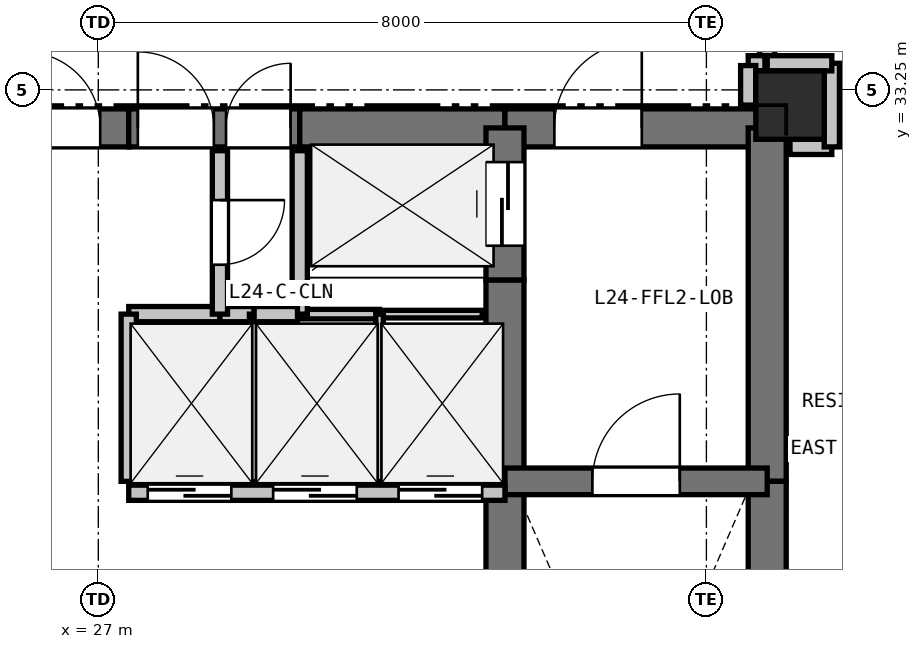
"""IFC4 building model, lengths in metres.
Left out: names, types, materials, properties, quantities, classifications, styles, units other than length and angle.
Written with IfcOpenShell. Run it as: python <this file> out.ifc"""

import sys

from ifc_helpers import new_model, si_unit, direction, frame, frame_2d, origin, origin_2d, place, context, subcontext, project, spatial, rectangle, extrude, element, fill, save


model = new_model("IFC4")
c1 = context("Model", 3, precision=1e-05, world=origin(), true_north=direction((0.0, 1.0)))
c2 = subcontext(c1, "Body", "Model", "MODEL_VIEW")
j1 = project(units=[si_unit("LENGTHUNIT", "METRE"), si_unit("PLANEANGLEUNIT", "RADIAN")], contexts=[c1])
p1 = place(None, origin())
s1 = spatial("IfcSite", under=j1, at=p1, CompositionType="ELEMENT")
p2 = place(p1, origin())
s2 = spatial("IfcBuilding", under=s1, at=p2, CompositionType="ELEMENT")
p3 = place(p2, frame((0.0, 0.0, 90.0)))
s3 = spatial("IfcBuildingStorey", under=s2, at=p3, CompositionType="ELEMENT", Elevation=90.0)
p4 = place(p3, frame((36.1, 33.05, 0.0), z_axis=(0.0, 0.0, 1.0), x_axis=(1.0, 0.0, 0.0)))
e1 = element("IfcColumn", 1, at=p4, inside=s3, PredefinedType="COLUMN", context=c2, shape_type="SweptSolid", body=[
    extrude(rectangle(XDim=0.9, YDim=0.9, at=origin_2d()), origin(), (0.0, 0.0, 1.0), 3.3),
])
p5 = place(p3, frame((25.65, 32.75, 0.0), z_axis=(0.0, 0.0, 1.0), x_axis=(1.0, 0.0, 0.0)))
e2 = element("IfcWall", 2, at=p5, inside=s3, PredefinedType="SHEAR", context=c2, shape_type="SweptSolid", body=[
    extrude(rectangle(XDim=1.75, YDim=0.5, at=frame_2d((0.875, 0.0))), origin(), (0.0, 0.0, 1.0), 3.05),
])
p6 = place(p5, frame((0.375, 0.0, 0.0)))
e3 = element("IfcOpeningElement", 3, at=p6, cuts=e2, PredefinedType="OPENING", context=c2, shape_type="SweptSolid", body=[
    extrude(rectangle(XDim=1.0, YDim=2.15, at=frame_2d((0.5, 1.075))), frame((0.0, 0.26, 0.0), z_axis=(0.0, -1.0, 0.0), x_axis=(1.0, 0.0, 0.0)), (0.0, 0.0, 1.0), 0.52),
])
p7 = place(p3, frame((27.4, 32.75, 0.0), z_axis=(0.0, 0.0, 1.0), x_axis=(1.0, 0.0, 0.0)))
e4 = element("IfcWall", 4, at=p7, inside=s3, PredefinedType="SHEAR", context=c2, shape_type="SweptSolid", body=[
    extrude(rectangle(XDim=2.25, YDim=0.5, at=frame_2d((1.125, 0.0))), origin(), (0.0, 0.0, 1.0), 3.05),
])
p8 = place(p7, frame((0.12, 0.0, 0.0)))
e5 = element("IfcOpeningElement", 5, at=p8, cuts=e4, PredefinedType="OPENING", context=c2, shape_type="SweptSolid", body=[
    extrude(rectangle(XDim=1.0, YDim=2.15, at=frame_2d((0.5, 1.075))), frame((0.0, 0.26, 0.0), z_axis=(0.0, -1.0, 0.0), x_axis=(1.0, 0.0, 0.0)), (0.0, 0.0, 1.0), 0.52),
])
p9 = place(p7, frame((1.28, 0.0, 0.0)))
e6 = element("IfcOpeningElement", 6, at=p9, cuts=e4, PredefinedType="OPENING", context=c2, shape_type="SweptSolid", body=[
    extrude(rectangle(XDim=0.85, YDim=2.1, at=frame_2d((0.425, 1.05))), frame((0.0, 0.26, 0.0), z_axis=(0.0, -1.0, 0.0), x_axis=(1.0, 0.0, 0.0)), (0.0, 0.0, 1.0), 0.52),
])
p10 = place(p3, frame((29.65, 32.75, 0.0), z_axis=(0.0, 0.0, 1.0), x_axis=(1.0, 0.0, 0.0)))
e7 = element("IfcWall", 7, at=p10, inside=s3, PredefinedType="SHEAR", context=c2, shape_type="SweptSolid", body=[
    extrude(rectangle(XDim=2.7, YDim=0.5, at=frame_2d((1.35, 0.0))), origin(), (0.0, 0.0, 1.0), 3.05),
])
p11 = place(p3, frame((32.35, 32.75, 0.0), z_axis=(0.0, 0.0, 1.0), x_axis=(1.0, 0.0, 0.0)))
e8 = element("IfcWall", 8, at=p11, inside=s3, PredefinedType="SHEAR", context=c2, shape_type="SweptSolid", body=[
    extrude(rectangle(XDim=3.45, YDim=0.5, at=frame_2d((1.725, 0.0))), origin(), (0.0, 0.0, 1.0), 3.05),
])
p12 = place(p11, frame((0.65, 0.0, 0.0)))
e9 = element("IfcOpeningElement", 9, at=p12, cuts=e8, PredefinedType="OPENING", context=c2, shape_type="SweptSolid", body=[
    extrude(rectangle(XDim=1.15, YDim=2.15, at=frame_2d((0.575, 1.075))), frame((0.0, 0.26, 0.0), z_axis=(0.0, -1.0, 0.0), x_axis=(1.0, 0.0, 0.0)), (0.0, 0.0, 1.0), 0.52),
])
p13 = place(p3, frame((35.8, 32.75, 0.0), z_axis=(0.0, 0.0, 1.0), x_axis=(0.0, -1.0, 0.0)))
e10 = element("IfcWall", 10, at=p13, inside=s3, PredefinedType="SHEAR", context=c2, shape_type="SweptSolid", body=[
    extrude(rectangle(XDim=4.65, YDim=0.5, at=frame_2d((2.325, 0.0))), origin(), (0.0, 0.0, 1.0), 3.05),
])
p14 = place(p3, frame((35.8, 28.1, 0.0), z_axis=(0.0, 0.0, 1.0), x_axis=(0.0, -1.0, 0.0)))
e11 = element("IfcWall", 11, at=p14, inside=s3, PredefinedType="SHEAR", context=c2, shape_type="SweptSolid", body=[
    extrude(rectangle(XDim=7.35, YDim=0.5, at=frame_2d((3.675, 0.0))), origin(), (0.0, 0.0, 1.0), 3.05),
])
p15 = place(p3, frame((32.35, 25.55, 0.0), z_axis=(0.0, 0.0, 1.0), x_axis=(0.0, 1.0, 0.0)))
e12 = element("IfcWall", 12, at=p15, inside=s3, PredefinedType="SHEAR", context=c2, shape_type="SweptSolid", body=[
    extrude(rectangle(XDim=2.4, YDim=0.5, at=frame_2d((1.2, 0.0))), origin(), (0.0, 0.0, 1.0), 3.05),
])
p16 = place(p3, frame((32.35, 27.95, 0.0), z_axis=(0.0, 0.0, 1.0), x_axis=(0.0, 1.0, 0.0)))
e13 = element("IfcWall", 13, at=p16, inside=s3, PredefinedType="SHEAR", context=c2, shape_type="SweptSolid", body=[
    extrude(rectangle(XDim=2.8, YDim=0.5, at=frame_2d((1.4, 0.0))), origin(), (0.0, 0.0, 1.0), 3.05),
])
p17 = place(p3, frame((32.35, 30.75, 0.0), z_axis=(0.0, 0.0, 1.0), x_axis=(0.0, 1.0, 0.0)))
e14 = element("IfcWall", 14, at=p17, inside=s3, PredefinedType="SHEAR", context=c2, shape_type="SweptSolid", body=[
    extrude(rectangle(XDim=2.0, YDim=0.5, at=frame_2d((1.0, 0.0))), origin(), (0.0, 0.0, 1.0), 3.05),
])
p18 = place(p17, frame((0.45, 0.0, 0.0)))
e15 = element("IfcOpeningElement", 15, at=p18, cuts=e14, PredefinedType="OPENING", context=c2, shape_type="SweptSolid", body=[
    extrude(rectangle(XDim=1.1, YDim=2.15, at=frame_2d((0.55, 1.075))), frame((0.0, 0.26, 0.0), z_axis=(0.0, -1.0, 0.0), x_axis=(1.0, 0.0, 0.0)), (0.0, 0.0, 1.0), 0.52),
])
p19 = place(p3, frame((32.35, 28.1, 0.0), z_axis=(0.0, 0.0, 1.0), x_axis=(1.0, 0.0, 0.0)))
e16 = element("IfcWall", 16, at=p19, inside=s3, PredefinedType="SHEAR", context=c2, shape_type="SweptSolid", body=[
    extrude(rectangle(XDim=3.45, YDim=0.35, at=frame_2d((1.725, 0.0))), origin(), (0.0, 0.0, 1.0), 3.05),
])
p20 = place(p19, frame((1.15, 0.0, 0.0)))
e17 = element("IfcOpeningElement", 17, at=p20, cuts=e16, PredefinedType="OPENING", context=c2, shape_type="SweptSolid", body=[
    extrude(rectangle(XDim=1.15, YDim=2.15, at=frame_2d((0.575, 1.075))), frame((0.0, 0.185, 0.0), z_axis=(0.0, -1.0, 0.0), x_axis=(1.0, 0.0, 0.0)), (0.0, 0.0, 1.0), 0.37),
])
p21 = place(p3, frame((27.4, 27.95, 0.0), z_axis=(0.0, 0.0, 1.0), x_axis=(1.0, 0.0, 0.0)))
e18 = element("IfcWall", 18, at=p21, inside=s3, PredefinedType="PARTITIONING", context=c2, shape_type="SweptSolid", body=[
    extrude(rectangle(XDim=4.95, YDim=0.2, at=frame_2d((2.475, 0.0))), origin(), (0.0, 0.0, 1.0), 3.05),
])
p22 = place(p21, frame((0.25, 0.0, 0.0)))
e19 = element("IfcOpeningElement", 19, at=p22, cuts=e18, PredefinedType="OPENING", context=c2, shape_type="SweptSolid", body=[
    extrude(rectangle(XDim=1.1, YDim=2.15, at=frame_2d((0.55, 1.075))), frame((0.0, 0.11, 0.0), z_axis=(0.0, -1.0, 0.0), x_axis=(1.0, 0.0, 0.0)), (0.0, 0.0, 1.0), 0.22),
])
p23 = place(p21, frame((1.9, 0.0, 0.0)))
e20 = element("IfcOpeningElement", 20, at=p23, cuts=e18, PredefinedType="OPENING", context=c2, shape_type="SweptSolid", body=[
    extrude(rectangle(XDim=1.1, YDim=2.15, at=frame_2d((0.55, 1.075))), frame((0.0, 0.11, 0.0), z_axis=(0.0, -1.0, 0.0), x_axis=(1.0, 0.0, 0.0)), (0.0, 0.0, 1.0), 0.22),
])
p24 = place(p21, frame((3.55, 0.0, 0.0)))
e21 = element("IfcOpeningElement", 21, at=p24, cuts=e18, PredefinedType="OPENING", context=c2, shape_type="SweptSolid", body=[
    extrude(rectangle(XDim=1.1, YDim=2.15, at=frame_2d((0.55, 1.075))), frame((0.0, 0.11, 0.0), z_axis=(0.0, -1.0, 0.0), x_axis=(1.0, 0.0, 0.0)), (0.0, 0.0, 1.0), 0.22),
])
p25 = place(p3, frame((32.05, 30.3, 0.0), z_axis=(0.0, 0.0, 1.0), x_axis=(-1.0, 0.0, 0.0)))
e22 = element("IfcWall", 22, at=p25, inside=s3, PredefinedType="PARTITIONING", context=c2, shape_type="SweptSolid", body=[
    extrude(rectangle(XDim=1.35, YDim=0.1, at=frame_2d((0.675, 0.0))), origin(), (0.0, 0.0, 1.0), 3.05),
])
p26 = place(p3, frame((30.7, 30.3, 0.0), z_axis=(0.0, 0.0, 1.0), x_axis=(-1.0, 0.0, 0.0)))
e23 = element("IfcWall", 23, at=p26, inside=s3, PredefinedType="PARTITIONING", context=c2, shape_type="SweptSolid", body=[
    extrude(rectangle(XDim=1.05, YDim=0.125, at=frame_2d((0.525, 0.0))), origin(), (0.0, 0.0, 1.0), 3.05),
])
p27 = place(p3, frame((29.65, 30.3, 0.0), z_axis=(0.0, 0.0, 1.0), x_axis=(0.0, 1.0, 0.0)))
e24 = element("IfcWall", 24, at=p27, inside=s3, PredefinedType="PARTITIONING", context=c2, shape_type="SweptSolid", body=[
    extrude(rectangle(XDim=2.15, YDim=0.2, at=frame_2d((1.075, 0.0))), origin(), (0.0, 0.0, 1.0), 3.05),
])
p28 = place(p3, frame((27.4, 30.3, 0.0), z_axis=(0.0, 0.0, 1.0), x_axis=(1.0, 0.0, 0.0)))
e25 = element("IfcWall", 25, at=p28, inside=s3, PredefinedType="PARTITIONING", context=c2, shape_type="SweptSolid", body=[
    extrude(rectangle(XDim=1.2, YDim=0.2, at=frame_2d((0.6, 0.0))), origin(), (0.0, 0.0, 1.0), 3.05),
])
p29 = place(p3, frame((28.6, 30.3, 0.0), z_axis=(0.0, 0.0, 1.0), x_axis=(1.0, 0.0, 0.0)))
e26 = element("IfcWall", 26, at=p29, inside=s3, PredefinedType="PARTITIONING", context=c2, shape_type="SweptSolid", body=[
    extrude(rectangle(XDim=0.45, YDim=0.2, at=frame_2d((0.225, 0.0))), origin(), (0.0, 0.0, 1.0), 3.05),
])
p30 = place(p3, frame((29.05, 30.3, 0.0), z_axis=(0.0, 0.0, 1.0), x_axis=(0.0, -1.0, 0.0)))
e27 = element("IfcWall", 27, at=p30, inside=s3, PredefinedType="PARTITIONING", context=c2, shape_type="SweptSolid", body=[
    extrude(rectangle(XDim=2.2, YDim=0.125, at=frame_2d((1.1, 0.0))), origin(), (0.0, 0.0, 1.0), 3.05),
])
p31 = place(p3, frame((27.4, 28.1, 0.0), z_axis=(0.0, 0.0, 1.0), x_axis=(0.0, 1.0, 0.0)))
e28 = element("IfcWall", 28, at=p31, inside=s3, PredefinedType="PARTITIONING", context=c2, shape_type="SweptSolid", body=[
    extrude(rectangle(XDim=2.2, YDim=0.2, at=frame_2d((1.1, 0.0))), origin(), (0.0, 0.0, 1.0), 3.05),
])
p32 = place(p3, frame((29.05, 30.3, 0.0), z_axis=(0.0, 0.0, 1.0), x_axis=(1.0, 0.0, 0.0)))
e29 = element("IfcWall", 29, at=p32, inside=s3, PredefinedType="PARTITIONING", context=c2, shape_type="SweptSolid", body=[
    extrude(rectangle(XDim=0.57, YDim=0.2, at=frame_2d((0.285, 0.0))), origin(), (0.0, 0.0, 1.0), 3.05),
])
p33 = place(p3, frame((30.7, 30.3, 0.0), z_axis=(0.0, 0.0, 1.0), x_axis=(0.0, -1.0, 0.0)))
e30 = element("IfcWall", 30, at=p33, inside=s3, PredefinedType="PARTITIONING", context=c2, shape_type="SweptSolid", body=[
    extrude(rectangle(XDim=2.2, YDim=0.1, at=frame_2d((1.1, 0.0))), origin(), (0.0, 0.0, 1.0), 3.05),
])
p34 = place(p3, frame((28.6, 32.45, 0.0), z_axis=(0.0, 0.0, 1.0), x_axis=(0.0, -1.0, 0.0)))
e31 = element("IfcWall", 31, at=p34, inside=s3, PredefinedType="PARTITIONING", context=c2, shape_type="SweptSolid", body=[
    extrude(rectangle(XDim=2.15, YDim=0.2, at=frame_2d((1.075, 0.0))), origin(), (0.0, 0.0, 1.0), 3.05),
])
p35 = place(p34, frame((0.65, 0.0, 0.0)))
e32 = element("IfcOpeningElement", 32, at=p35, cuts=e31, PredefinedType="OPENING", context=c2, shape_type="SweptSolid", body=[
    extrude(rectangle(XDim=0.85, YDim=2.1, at=frame_2d((0.425, 1.05))), frame((0.0, 0.11, 0.0), z_axis=(0.0, -1.0, 0.0), x_axis=(1.0, 0.0, 0.0)), (0.0, 0.0, 1.0), 0.22),
])
p36 = place(p3, frame((35.8, 35.35, 0.0), z_axis=(0.0, 0.0, 1.0), x_axis=(0.0, -1.0, 0.0)))
e33 = element("IfcWall", 33, at=p36, inside=s3, PredefinedType="PARTITIONING", context=c2, shape_type="SweptSolid", body=[
    extrude(rectangle(XDim=1.75, YDim=0.2, at=frame_2d((0.875, 0.0))), origin(), (0.0, 0.0, 1.0), 3.05),
])
p37 = place(p36, frame((0.375, 0.0, 0.0)))
e34 = element("IfcOpeningElement", 34, at=p37, cuts=e33, PredefinedType="OPENING", context=c2, shape_type="SweptSolid", body=[
    extrude(rectangle(XDim=1.0, YDim=2.15, at=frame_2d((0.5, 1.075))), frame((0.0, 0.11, 0.0), z_axis=(0.0, -1.0, 0.0), x_axis=(1.0, 0.0, 0.0)), (0.0, 0.0, 1.0), 0.22),
])
p38 = place(p3, frame((35.77, 33.6, 0.0), z_axis=(0.0, 0.0, 1.0), x_axis=(-1.0, 0.0, 0.0)))
e35 = element("IfcWall", 35, at=p38, inside=s3, PredefinedType="PARTITIONING", context=c2, shape_type="SweptSolid", body=[
    extrude(rectangle(XDim=0.22, YDim=0.2, at=frame_2d((0.11, 0.0))), origin(), (0.0, 0.0, 1.0), 3.05),
])
p39 = place(p3, frame((35.55, 33.57, 0.0), z_axis=(0.0, 0.0, 1.0), x_axis=(0.0, -1.0, 0.0)))
e36 = element("IfcWall", 36, at=p39, inside=s3, PredefinedType="PARTITIONING", context=c2, shape_type="SweptSolid", body=[
    extrude(rectangle(XDim=0.52, YDim=0.2, at=frame_2d((0.26, 0.0))), origin(), (0.0, 0.0, 1.0), 2.498),
])
p40 = place(p3, frame((36.1, 32.5, 0.0), z_axis=(0.0, 0.0, 1.0), x_axis=(1.0, 0.0, 0.0)))
e37 = element("IfcWall", 37, at=p40, inside=s3, PredefinedType="PARTITIONING", context=c2, shape_type="SweptSolid", body=[
    extrude(rectangle(XDim=0.55, YDim=0.2, at=frame_2d((0.275, 0.0))), origin(), (0.0, 0.0, 1.0), 2.498),
])
p41 = place(p3, frame((36.65, 32.5, 0.0), z_axis=(0.0, 0.0, 1.0), x_axis=(0.0, 1.0, 0.0)))
e38 = element("IfcWall", 38, at=p41, inside=s3, PredefinedType="PARTITIONING", context=c2, shape_type="SweptSolid", body=[
    extrude(rectangle(XDim=1.1, YDim=0.2, at=frame_2d((0.55, 0.0))), origin(), (0.0, 0.0, 1.0), 2.423),
])
p42 = place(p3, frame((36.65, 33.6, 0.0), z_axis=(0.0, 0.0, 1.0), x_axis=(-1.0, 0.0, 0.0)))
e39 = element("IfcWall", 39, at=p42, inside=s3, PredefinedType="PARTITIONING", context=c2, shape_type="SweptSolid", body=[
    extrude(rectangle(XDim=0.85, YDim=0.2, at=frame_2d((0.425, 0.0))), origin(), (0.0, 0.0, 1.0), 2.423),
])
p43 = place(p22, origin())
e40 = element("IfcDoor", 40, at=p43, inside=s3, OperationType="SLIDING_TO_LEFT", PredefinedType="DOOR", context=c2, shape_type="SweptSolid", body=[
    extrude(rectangle(XDim=1.1, YDim=2.15, at=frame_2d((0.55, 1.075))), frame((0.0, 0.025, 0.0), z_axis=(0.0, -1.0, 0.0), x_axis=(1.0, 0.0, 0.0)), (0.0, 0.0, 1.0), 0.05),
])
fill(e19, e40)
p44 = place(p23, origin())
e41 = element("IfcDoor", 41, at=p44, inside=s3, OperationType="SLIDING_TO_LEFT", PredefinedType="DOOR", context=c2, shape_type="SweptSolid", body=[
    extrude(rectangle(XDim=1.1, YDim=2.15, at=frame_2d((0.55, 1.075))), frame((0.0, 0.025, 0.0), z_axis=(0.0, -1.0, 0.0), x_axis=(1.0, 0.0, 0.0)), (0.0, 0.0, 1.0), 0.05),
])
fill(e20, e41)
p45 = place(p24, origin())
e42 = element("IfcDoor", 42, at=p45, inside=s3, OperationType="SLIDING_TO_LEFT", PredefinedType="DOOR", context=c2, shape_type="SweptSolid", body=[
    extrude(rectangle(XDim=1.1, YDim=2.15, at=frame_2d((0.55, 1.075))), frame((0.0, 0.025, 0.0), z_axis=(0.0, -1.0, 0.0), x_axis=(1.0, 0.0, 0.0)), (0.0, 0.0, 1.0), 0.05),
])
fill(e21, e42)
p46 = place(p6, origin())
e43 = element("IfcDoor", 43, at=p46, inside=s3, OperationType="SINGLE_SWING_LEFT", PredefinedType="DOOR", context=c2, shape_type="SweptSolid", body=[
    extrude(rectangle(XDim=1.0, YDim=2.15, at=frame_2d((0.5, 1.075))), frame((0.0, 0.025, 0.0), z_axis=(0.0, -1.0, 0.0), x_axis=(1.0, 0.0, 0.0)), (0.0, 0.0, 1.0), 0.05),
])
fill(e3, e43)
p47 = place(p18, origin())
e44 = element("IfcDoor", 44, at=p47, inside=s3, OperationType="SLIDING_TO_LEFT", PredefinedType="DOOR", context=c2, shape_type="SweptSolid", body=[
    extrude(rectangle(XDim=1.1, YDim=2.15, at=frame_2d((0.55, 1.075))), frame((0.0, 0.025, 0.0), z_axis=(0.0, -1.0, 0.0), x_axis=(1.0, 0.0, 0.0)), (0.0, 0.0, 1.0), 0.05),
])
fill(e15, e44)
p48 = place(p20, origin())
e45 = element("IfcDoor", 45, at=p48, inside=s3, OperationType="SINGLE_SWING_RIGHT", PredefinedType="DOOR", context=c2, shape_type="SweptSolid", body=[
    extrude(rectangle(XDim=1.15, YDim=2.15, at=frame_2d((0.575, 1.075))), frame((0.0, 0.025, 0.0), z_axis=(0.0, -1.0, 0.0), x_axis=(1.0, 0.0, 0.0)), (0.0, 0.0, 1.0), 0.05),
])
fill(e17, e45)
p49 = place(p12, origin())
e46 = element("IfcDoor", 46, at=p49, inside=s3, OperationType="SINGLE_SWING_RIGHT", PredefinedType="DOOR", context=c2, shape_type="SweptSolid", body=[
    extrude(rectangle(XDim=1.15, YDim=2.15, at=frame_2d((0.575, 1.075))), frame((0.0, 0.025, 0.0), z_axis=(0.0, -1.0, 0.0), x_axis=(1.0, 0.0, 0.0)), (0.0, 0.0, 1.0), 0.05),
])
fill(e9, e46)
p50 = place(p8, origin())
e47 = element("IfcDoor", 47, at=p50, inside=s3, OperationType="SINGLE_SWING_LEFT", PredefinedType="DOOR", context=c2, shape_type="SweptSolid", body=[
    extrude(rectangle(XDim=1.0, YDim=2.15, at=frame_2d((0.5, 1.075))), frame((0.0, 0.025, 0.0), z_axis=(0.0, -1.0, 0.0), x_axis=(1.0, 0.0, 0.0)), (0.0, 0.0, 1.0), 0.05),
])
fill(e5, e47)
p51 = place(p35, origin())
e48 = element("IfcDoor", 48, at=p51, inside=s3, OperationType="SINGLE_SWING_LEFT", PredefinedType="DOOR", context=c2, shape_type="SweptSolid", body=[
    extrude(rectangle(XDim=0.85, YDim=2.1, at=frame_2d((0.425, 1.05))), frame((0.0, 0.025, 0.0), z_axis=(0.0, -1.0, 0.0), x_axis=(1.0, 0.0, 0.0)), (0.0, 0.0, 1.0), 0.05),
])
fill(e32, e48)
p52 = place(p9, origin())
e49 = element("IfcDoor", 49, at=p52, inside=s3, OperationType="SINGLE_SWING_RIGHT", PredefinedType="DOOR", context=c2, shape_type="SweptSolid", body=[
    extrude(rectangle(XDim=0.85, YDim=2.1, at=frame_2d((0.425, 1.05))), frame((0.0, 0.025, 0.0), z_axis=(0.0, -1.0, 0.0), x_axis=(1.0, 0.0, 0.0)), (0.0, 0.0, 1.0), 0.05),
])
fill(e6, e49)
save(model, sys.argv[1])
